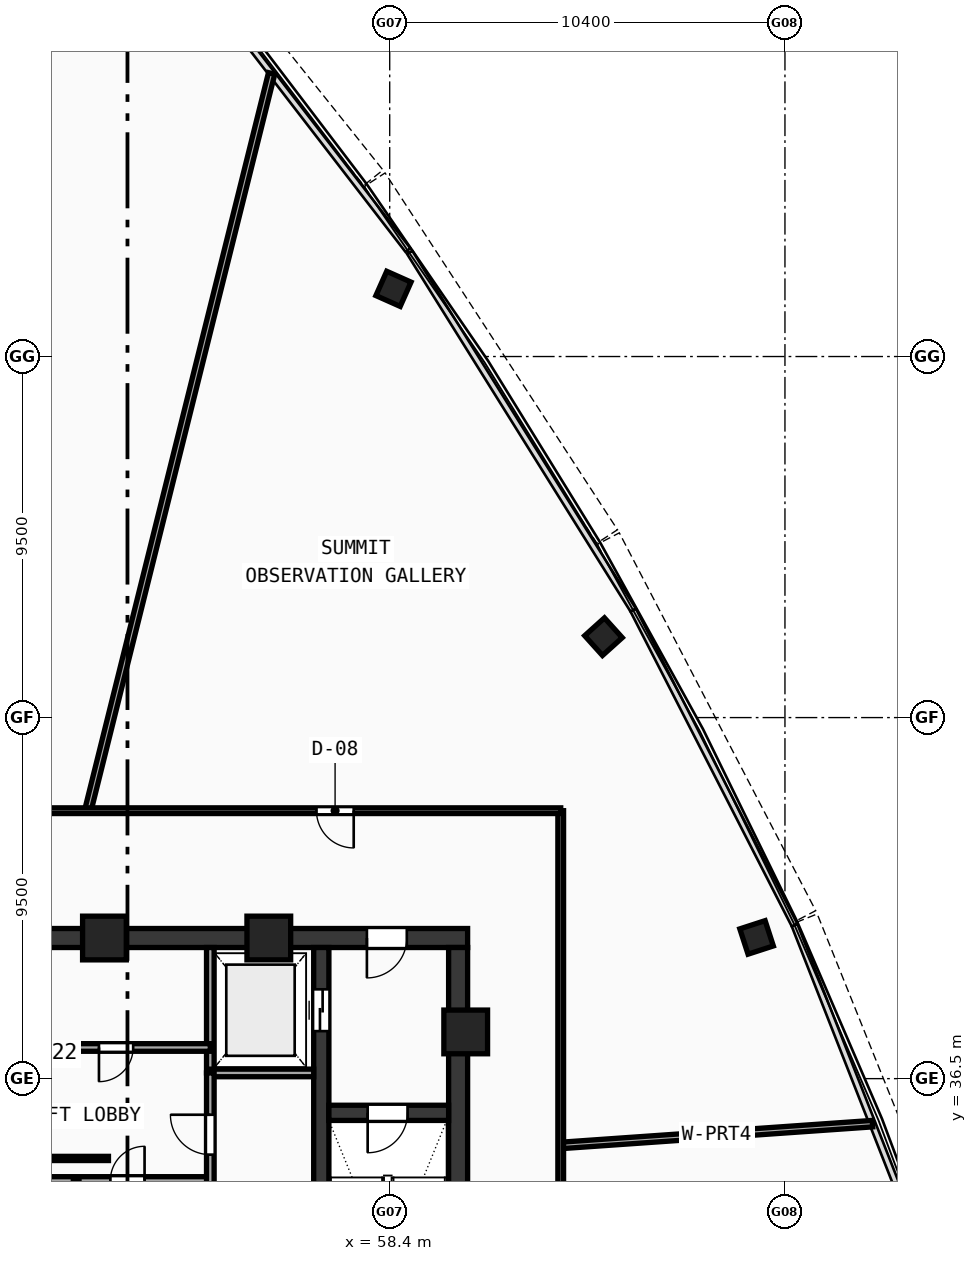
"""IFC4 building model, lengths in metres.
Left out: names, types, materials, properties, quantities, classifications, styles, units other than length and angle.
Written with IfcOpenShell. Run it as: python <this file> out.ifc"""

import sys

from ifc_helpers import new_model, si_unit, direction, frame, frame_2d, origin, origin_with_axes, origin_2d, place, context, subcontext, project, spatial, rectangle, hollow_rectangle, extrude, source, transform, mapped, element, fill, save


model = new_model("IFC4")
c1 = context("Model", 3, precision=1e-05, world=origin(), true_north=direction((0.0, 1.0)))
c2 = subcontext(c1, "Body", "Model", "MODEL_VIEW")
j1 = project(units=[si_unit("LENGTHUNIT", "METRE"), si_unit("PLANEANGLEUNIT", "RADIAN")], contexts=[c1])
p1 = place(None, origin())
s1 = spatial("IfcSite", under=j1, at=p1, CompositionType="ELEMENT")
p2 = place(p1, origin())
s2 = spatial("IfcBuilding", under=s1, at=p2, CompositionType="ELEMENT")
p3 = place(p2, frame((0.0, 0.0, 366.76)))
s3 = spatial("IfcBuildingStorey", under=s2, at=p3, CompositionType="ELEMENT", Elevation=366.76)
p4 = place(p3, frame((49.2, 40.2, 0.0), z_axis=(0.0, 0.0, 1.0), x_axis=(1.0, 0.0, 0.0)))
e1 = element("IfcWall", 1, at=p4, inside=s3, PredefinedType="SHEAR", context=c2, shape_type="SweptSolid", body=[
    extrude(rectangle(XDim=11.25, YDim=0.5, at=frame_2d((5.625, 0.0))), origin(), (0.0, 0.0, 1.0), 4.72),
])
p5 = place(p4, frame((8.6, 0.0, 0.0)))
e2 = element("IfcOpeningElement", 2, at=p5, cuts=e1, PredefinedType="OPENING", context=c2, shape_type="SweptSolid", body=[
    extrude(rectangle(XDim=1.05, YDim=2.1, at=frame_2d((0.525, 1.05))), frame((0.0, 0.26, 0.0), z_axis=(0.0, -1.0, 0.0), x_axis=(1.0, 0.0, 0.0)), (0.0, 0.0, 1.0), 0.52),
])
p6 = place(p3, frame((60.2, 27.75, 0.0), z_axis=(0.0, 0.0, 1.0), x_axis=(0.0, 1.0, 0.0)))
e3 = element("IfcWall", 3, at=p6, inside=s3, PredefinedType="SHEAR", context=c2, shape_type="SweptSolid", body=[
    extrude(rectangle(XDim=12.2, YDim=0.5, at=frame_2d((6.1, 0.0))), origin(), (0.0, 0.0, 1.0), 4.72),
])
p7 = place(p3, frame((56.6, 27.75, 0.0), z_axis=(0.0, 0.0, 1.0), x_axis=(0.0, 1.0, 0.0)))
e4 = element("IfcWall", 4, at=p7, inside=s3, PredefinedType="SHEAR", context=c2, shape_type="SweptSolid", body=[
    extrude(rectangle(XDim=12.2, YDim=0.4, at=frame_2d((6.1, 0.0))), origin(), (0.0, 0.0, 1.0), 4.72),
])
p8 = place(p7, frame((10.0, 0.0, 0.0)))
e5 = element("IfcOpeningElement", 5, at=p8, cuts=e4, PredefinedType="OPENING", context=c2, shape_type="SweptSolid", body=[
    extrude(rectangle(XDim=1.1, YDim=2.1, at=frame_2d((0.55, 1.05))), frame((0.0, 0.21, 0.0), z_axis=(0.0, -1.0, 0.0), x_axis=(1.0, 0.0, 0.0)), (0.0, 0.0, 1.0), 0.42),
])
p9 = place(p3, frame((56.8, 35.6, 0.0), z_axis=(0.0, 0.0, 1.0), x_axis=(1.0, 0.0, 0.0)))
e6 = element("IfcWall", 6, at=p9, inside=s3, PredefinedType="SHEAR", context=c2, shape_type="SweptSolid", body=[
    extrude(rectangle(XDim=3.15, YDim=0.4, at=frame_2d((1.575, 0.0))), origin(), (0.0, 0.0, 1.0), 4.72),
])
p10 = place(p9, frame((1.02, 0.0, 0.0)))
e7 = element("IfcOpeningElement", 7, at=p10, cuts=e6, PredefinedType="OPENING", context=c2, shape_type="SweptSolid", body=[
    extrude(rectangle(XDim=1.05, YDim=2.1, at=frame_2d((0.525, 1.05))), frame((0.0, 0.21, 0.0), z_axis=(0.0, -1.0, 0.0), x_axis=(1.0, 0.0, 0.0)), (0.0, 0.0, 1.0), 0.42),
])
m1 = source(origin(), c2, "Body", "SweptSolid", [
    extrude(hollow_rectangle(XDim=1.15, YDim=1.15, WallThickness=0.048, at=origin_2d()), origin(), (0.0, 0.0, 1.0), 5.0),
])
for number, where, z_axis, x_axis in (
    (8, (60.4, 37.729, -0.28), (0.0, 0.0, 1.0), (1.0, 0.0, 0.0)),
    (9, (55.219, 40.2, -0.28), (0.0, 0.0, 1.0), (1.0, 0.0, 0.0)),
    (10, (50.894, 40.2, -0.28), (0.0, 0.0, 1.0), (1.0, 0.0, 0.0)),
):
    element("IfcColumn", number, at=place(p3, frame(where, z_axis=z_axis, x_axis=x_axis)), inside=s3, PredefinedType="COLUMN", context=c2, shape_type="MappedRepresentation", body=[
        mapped(m1, transform((0.0, 0.0, 0.0), scale=1.0)),
    ])
m2 = source(origin(), c2, "Body", "SweptSolid", [
    extrude(hollow_rectangle(XDim=0.7, YDim=0.7, WallThickness=0.026, at=origin_2d()), origin(), (0.0, 0.0, 1.0), 5.0),
])
for number, where, z_axis, x_axis in (
    (11, (68.053, 40.216, -0.28), (0.0, 0.0, 1.0), (-0.309, 0.951, 0.0)),
    (12, (64.025, 48.129, -0.28), (0.0, 0.0, 1.0), (-0.669, 0.743, 0.0)),
    (13, (58.499, 57.281, -0.28), (0.0, 0.0, 1.0), (-0.914, 0.407, 0.0)),
):
    element("IfcColumn", number, at=place(p3, frame(where, z_axis=z_axis, x_axis=x_axis)), inside=s3, PredefinedType="COLUMN", context=c2, shape_type="MappedRepresentation", body=[
        mapped(m2, transform((0.0, 0.0, 0.0), scale=1.0)),
    ])
p11 = place(p3, frame((53.68, 36.65, 0.0), z_axis=(0.0, 0.0, 1.0), x_axis=(0.0, 1.0, 0.0)))
e14 = element("IfcWall", 14, at=p11, inside=s3, PredefinedType="SOLIDWALL", context=c2, shape_type="SweptSolid", body=[
    extrude(rectangle(XDim=3.3, YDim=0.2, at=frame_2d((1.65, 0.0))), origin(), (0.0, 0.0, 1.0), 4.72),
])
p12 = place(p3, frame((53.68, 36.65, 0.0), z_axis=(0.0, 0.0, 1.0), x_axis=(1.0, 0.0, 0.0)))
e15 = element("IfcWall", 15, at=p12, inside=s3, PredefinedType="SOLIDWALL", context=c2, shape_type="SweptSolid", body=[
    extrude(rectangle(XDim=2.72, YDim=0.2, at=frame_2d((1.36, 0.0))), origin(), (0.0, 0.0, 1.0), 4.72),
])
p13 = place(p3, frame((48.95, 37.32, 0.0), z_axis=(0.0, 0.0, 1.0), x_axis=(1.0, 0.0, 0.0)))
e16 = element("IfcWall", 16, at=p13, inside=s3, PredefinedType="SOLIDWALL", context=c2, shape_type="SweptSolid", body=[
    extrude(rectangle(XDim=4.73, YDim=0.2, at=frame_2d((2.365, 0.0))), origin(), (0.0, 0.0, 1.0), 4.72),
])
p14 = place(p13, frame((1.8, 0.0, 0.0)))
e17 = element("IfcOpeningElement", 17, at=p14, cuts=e16, PredefinedType="OPENING", context=c2, shape_type="SweptSolid", body=[
    extrude(rectangle(XDim=0.9, YDim=2.1, at=frame_2d((0.45, 1.05))), frame((0.0, 0.11, 0.0), z_axis=(0.0, -1.0, 0.0), x_axis=(1.0, 0.0, 0.0)), (0.0, 0.0, 1.0), 0.22),
])
p15 = place(p3, frame((43.85, 33.82, 0.0), z_axis=(0.0, 0.0, 1.0), x_axis=(1.0, 0.0, 0.0)))
e18 = element("IfcWall", 18, at=p15, inside=s3, PredefinedType="SOLIDWALL", context=c2, shape_type="SweptSolid", body=[
    extrude(rectangle(XDim=9.83, YDim=0.2, at=frame_2d((4.915, 0.0))), origin(), (0.0, 0.0, 1.0), 4.72),
])
p16 = place(p15, frame((1.2, 0.0, 0.0)))
e19 = element("IfcOpeningElement", 19, at=p16, cuts=e18, PredefinedType="OPENING", context=c2, shape_type="SweptSolid", body=[
    extrude(rectangle(XDim=0.9, YDim=2.1, at=frame_2d((0.45, 1.05))), frame((0.0, 0.11, 0.0), z_axis=(0.0, -1.0, 0.0), x_axis=(1.0, 0.0, 0.0)), (0.0, 0.0, 1.0), 0.22),
])
p17 = place(p15, frame((7.2, 0.0, 0.0)))
e20 = element("IfcOpeningElement", 20, at=p17, cuts=e18, PredefinedType="OPENING", context=c2, shape_type="SweptSolid", body=[
    extrude(rectangle(XDim=0.9, YDim=2.1, at=frame_2d((0.45, 1.05))), frame((0.0, 0.11, 0.0), z_axis=(0.0, -1.0, 0.0), x_axis=(1.0, 0.0, 0.0)), (0.0, 0.0, 1.0), 0.22),
])
p18 = place(p3, frame((53.68, 27.6, 0.0), z_axis=(0.0, 0.0, 1.0), x_axis=(0.0, 1.0, 0.0)))
e21 = element("IfcWall", 21, at=p18, inside=s3, PredefinedType="SOLIDWALL", context=c2, shape_type="SweptSolid", body=[
    extrude(rectangle(XDim=9.05, YDim=0.2, at=frame_2d((4.525, 0.0))), origin(), (0.0, 0.0, 1.0), 4.72),
])
p19 = place(p18, frame((6.9, 0.0, 0.0)))
e22 = element("IfcOpeningElement", 22, at=p19, cuts=e21, PredefinedType="OPENING", context=c2, shape_type="SweptSolid", body=[
    extrude(rectangle(XDim=1.05, YDim=2.1, at=frame_2d((0.525, 1.05))), frame((0.0, 0.11, 0.0), z_axis=(0.0, -1.0, 0.0), x_axis=(1.0, 0.0, 0.0)), (0.0, 0.0, 1.0), 0.22),
])
p20 = place(p3, frame((50.15, 31.12, 0.0), z_axis=(0.0, 0.0, 1.0), x_axis=(0.0, 1.0, 0.0)))
e23 = element("IfcWall", 23, at=p20, inside=s3, PredefinedType="PARTITIONING", context=c2, shape_type="SweptSolid", body=[
    extrude(rectangle(XDim=2.7, YDim=0.15, at=frame_2d((1.35, 0.0))), origin(), (0.0, 0.0, 1.0), 4.72),
])
p21 = place(p3, frame((62.9, 34.742, 0.0), z_axis=(0.0, 0.0, 1.0), x_axis=(0.99756353515, 0.069763839764, 0.0)))
e24 = element("IfcWall", 24, at=p21, inside=s3, PredefinedType="PARTITIONING", context=c2, shape_type="SweptSolid", body=[
    extrude(rectangle(XDim=8.224, YDim=0.17, at=frame_2d((4.112, 0.0))), origin(), (0.0, 0.0, 1.0), 4.12),
])
p22 = place(p3, frame((50.456, 43.55, 0.0), z_axis=(0.0, 0.0, 1.0), x_axis=(0.241923592063, 0.970295303299, 0.0)))
e25 = element("IfcWall", 25, at=p22, inside=s3, PredefinedType="PARTITIONING", context=c2, shape_type="SweptSolid", body=[
    extrude(rectangle(XDim=19.994, YDim=0.17, at=frame_2d((9.997, 0.0))), origin(), (0.0, 0.0, 1.0), 4.72),
])
p23 = place(p3, frame((62.9, 24.9, 0.0), z_axis=(0.0, 0.0, 1.0), x_axis=(0.0, 1.0, 0.0)))
e26 = element("IfcWall", 26, at=p23, inside=s3, PredefinedType="PARTITIONING", context=c2, shape_type="SweptSolid", body=[
    extrude(rectangle(XDim=18.65, YDim=0.15, at=frame_2d((9.325, 0.0))), origin(), (0.0, 0.0, 1.0), 4.12),
])
p24 = place(p3, frame((62.9, 43.55, 0.0), z_axis=(0.0, 0.0, 1.0), x_axis=(-1.0, 0.0, 0.0)))
e27 = element("IfcWall", 27, at=p24, inside=s3, PredefinedType="PARTITIONING", context=c2, shape_type="SweptSolid", body=[
    extrude(rectangle(XDim=29.8, YDim=0.15, at=frame_2d((14.9, 0.0))), origin(), (0.0, 0.0, 1.0), 4.12),
])
p25 = place(p24, frame((5.447, 0.0, 0.0)))
e28 = element("IfcOpeningElement", 28, at=p25, cuts=e27, PredefinedType="OPENING", context=c2, shape_type="SweptSolid", body=[
    extrude(rectangle(XDim=0.98, YDim=2.12, at=frame_2d((0.49, 1.06))), frame((0.0, 0.085, 0.0), z_axis=(0.0, -1.0, 0.0), x_axis=(1.0, 0.0, 0.0)), (0.0, 0.0, 1.0), 0.17),
])
p26 = place(p24, frame((20.947, 0.0, 0.0)))
e29 = element("IfcOpeningElement", 29, at=p26, cuts=e27, PredefinedType="OPENING", context=c2, shape_type="SweptSolid", body=[
    extrude(rectangle(XDim=0.98, YDim=2.12, at=frame_2d((0.49, 1.06))), frame((0.0, 0.085, 0.0), z_axis=(0.0, -1.0, 0.0), x_axis=(1.0, 0.0, 0.0)), (0.0, 0.0, 1.0), 0.17),
])
p27 = place(p3, frame((45.0, 34.4, 0.0), z_axis=(0.0, 0.0, 1.0), x_axis=(1.0, 0.0, 0.0)))
e30 = element("IfcWall", 30, at=p27, inside=s3, PredefinedType="MOVABLE", context=c2, shape_type="SweptSolid", body=[
    extrude(rectangle(XDim=6.0, YDim=0.11, at=frame_2d((3.0, 0.0))), origin(), (0.0, 0.0, 1.0), 2.5),
])
m3 = source(origin(), c2, "Body", "SweptSolid", [
    extrude(rectangle(XDim=1.05, YDim=2.1, at=frame_2d((0.525, 1.05))), frame((0.0, 0.025, 0.0), z_axis=(0.0, -1.0, 0.0), x_axis=(1.0, 0.0, 0.0)), (0.0, 0.0, 1.0), 0.05),
])
p28 = place(p10, frame((1.05, 0.0, 0.0), z_axis=(0.0, 0.0, 1.0), x_axis=(-1.0, 0.0, 0.0)))
e31 = element("IfcDoor", 31, at=p28, inside=s3, OperationType="SINGLE_SWING_RIGHT", PredefinedType="DOOR", context=c2, shape_type="MappedRepresentation", body=[
    mapped(m3, transform((0.0, 0.0, 0.0), scale=1.0)),
])
fill(e7, e31)
p29 = place(p5, frame((1.05, 0.0, 0.0), z_axis=(0.0, 0.0, 1.0), x_axis=(-1.0, 0.0, 0.0)))
e32 = element("IfcDoor", 32, at=p29, inside=s3, OperationType="SINGLE_SWING_RIGHT", PredefinedType="DOOR", context=c2, shape_type="MappedRepresentation", body=[
    mapped(m3, transform((0.0, 0.0, 0.0), scale=1.0)),
])
fill(e2, e32)
m4 = source(origin(), c2, "Body", "SweptSolid", [
    extrude(rectangle(XDim=1.1, YDim=2.1, at=frame_2d((0.55, 1.05))), frame((0.0, 0.025, 0.0), z_axis=(0.0, -1.0, 0.0), x_axis=(1.0, 0.0, 0.0)), (0.0, 0.0, 1.0), 0.05),
])
p30 = place(p8, origin_with_axes())
e33 = element("IfcDoor", 33, at=p30, inside=s3, OperationType="DOUBLE_DOOR_SLIDING", PredefinedType="DOOR", context=c2, shape_type="MappedRepresentation", body=[
    mapped(m4, transform((0.0, 0.0, 0.0), scale=1.0)),
])
fill(e5, e33)
m5 = source(origin(), c2, "Body", "SweptSolid", [
    extrude(rectangle(XDim=0.9, YDim=2.1, at=frame_2d((0.45, 1.05))), frame((0.0, 0.025, 0.0), z_axis=(0.0, -1.0, 0.0), x_axis=(1.0, 0.0, 0.0)), (0.0, 0.0, 1.0), 0.05),
])
p31 = place(p14, frame((0.9, 0.0, 0.0), z_axis=(0.0, 0.0, 1.0), x_axis=(-1.0, 0.0, 0.0)))
e34 = element("IfcDoor", 34, at=p31, inside=s3, OperationType="SINGLE_SWING_RIGHT", PredefinedType="DOOR", context=c2, shape_type="MappedRepresentation", body=[
    mapped(m5, transform((0.0, 0.0, 0.0), scale=1.0)),
])
fill(e17, e34)
p32 = place(p17, origin_with_axes())
e35 = element("IfcDoor", 35, at=p32, inside=s3, OperationType="SINGLE_SWING_RIGHT", PredefinedType="DOOR", context=c2, shape_type="MappedRepresentation", body=[
    mapped(m5, transform((0.0, 0.0, 0.0), scale=1.0)),
])
fill(e20, e35)
p33 = place(p19, origin_with_axes())
e36 = element("IfcDoor", 36, at=p33, inside=s3, OperationType="SINGLE_SWING_RIGHT", PredefinedType="DOOR", context=c2, shape_type="MappedRepresentation", body=[
    mapped(m3, transform((0.0, 0.0, 0.0), scale=1.0)),
])
fill(e22, e36)
m6 = source(origin(), c2, "Body", "SweptSolid", [
    extrude(rectangle(XDim=0.98, YDim=2.12, at=frame_2d((0.49, 1.06))), frame((0.0, 0.025, 0.0), z_axis=(0.0, -1.0, 0.0), x_axis=(1.0, 0.0, 0.0)), (0.0, 0.0, 1.0), 0.05),
])
p34 = place(p25, origin_with_axes())
e37 = element("IfcDoor", 37, at=p34, inside=s3, OperationType="SINGLE_SWING_LEFT", PredefinedType="DOOR", context=c2, shape_type="MappedRepresentation", body=[
    mapped(m6, transform((0.0, 0.0, 0.0), scale=1.0)),
])
fill(e28, e37)
save(model, sys.argv[1])
